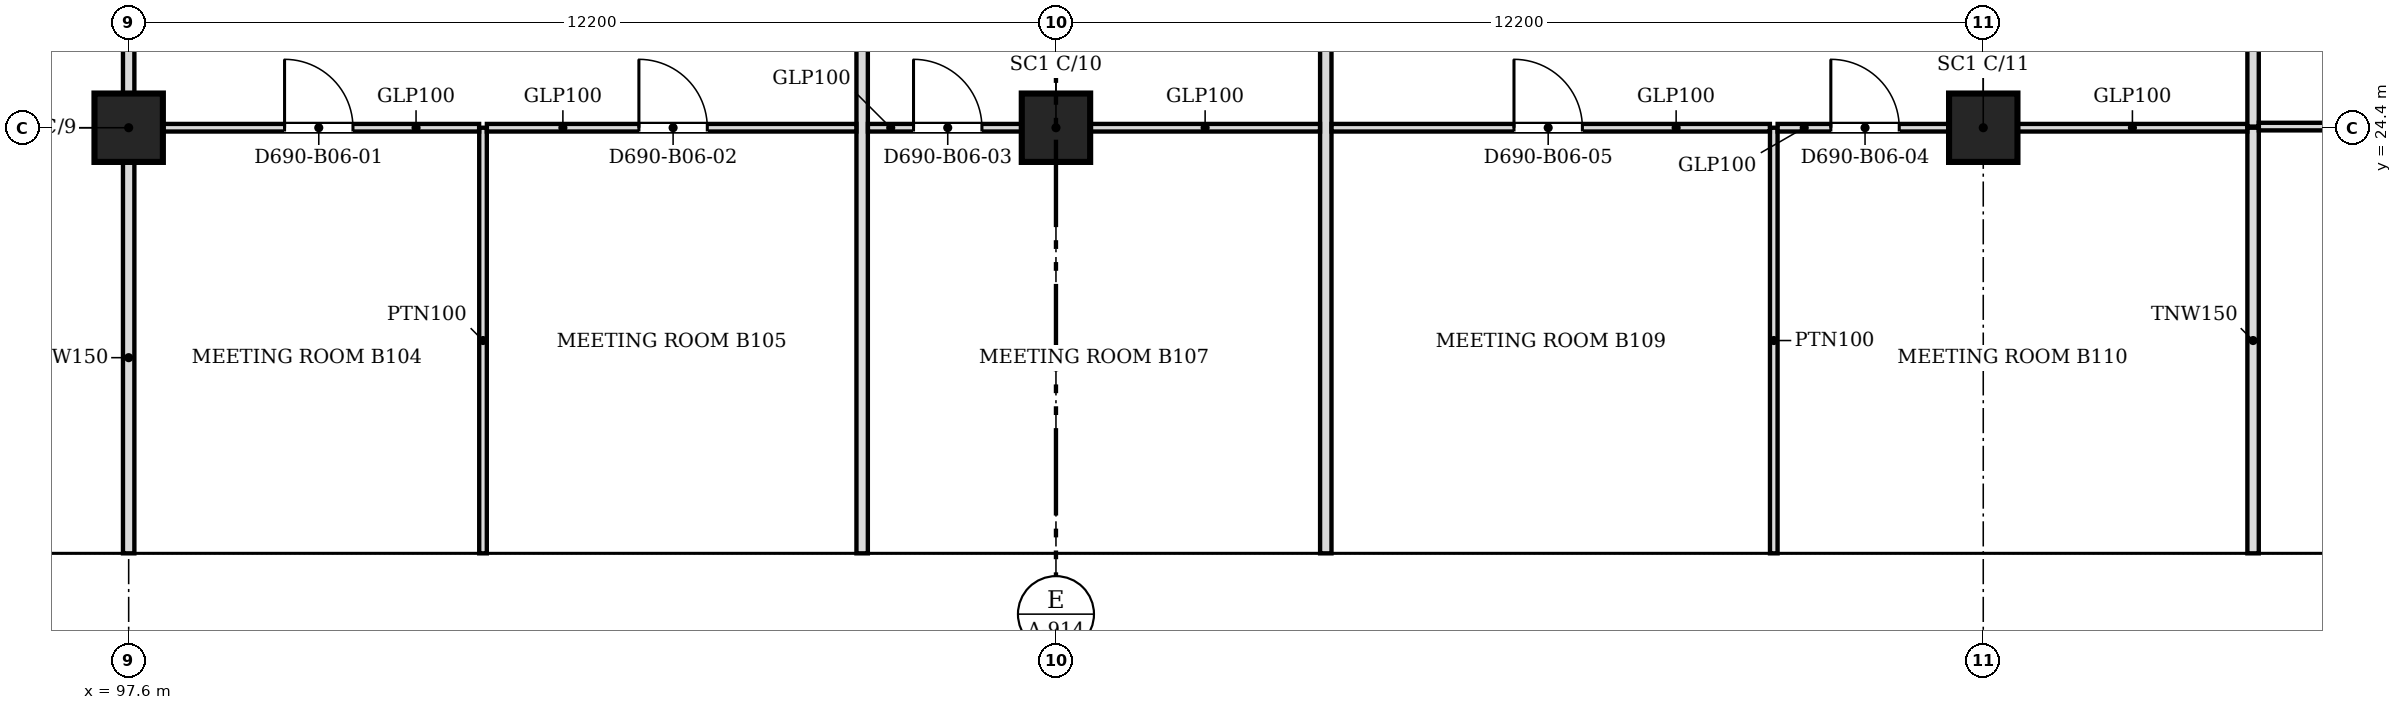
"""IFC4 building model, lengths in metres.
Left out: names, types, materials, properties, quantities, classifications, styles, units other than length and angle.
Written with IfcOpenShell. Run it as: python <this file> out.ifc"""

import sys

from ifc_helpers import new_model, si_unit, direction, frame, frame_2d, origin, origin_2d, place, context, subcontext, project, spatial, polyline, rectangle, outline, extrude, faceted_brep, source, transform, mapped, element, fill, save


model = new_model("IFC4")
c1 = context("Model", 3, precision=1e-05, world=origin(), true_north=direction((0.0, 1.0)))
c2 = subcontext(c1, "Body", "Model", "MODEL_VIEW")
j1 = project(units=[si_unit("LENGTHUNIT", "METRE"), si_unit("PLANEANGLEUNIT", "RADIAN")], contexts=[c1])
p1 = place(None, origin())
s1 = spatial("IfcSite", under=j1, at=p1, CompositionType="ELEMENT")
p2 = place(p1, origin())
s2 = spatial("IfcBuilding", under=s1, at=p2, CompositionType="ELEMENT")
p3 = place(p2, frame((0.0, 0.0, 56.2)))
s3 = spatial("IfcBuildingStorey", under=s2, at=p3, CompositionType="ELEMENT", Elevation=56.2)
for number, where, z_axis, x_axis in (
    (1, (97.6, 24.4, 0.0), (0.0, 0.0, 1.0), (1.0, 0.0, 0.0)),
    (2, (109.8, 24.4, 0.0), (0.0, 0.0, 1.0), (1.0, 0.0, 0.0)),
    (3, (122.0, 24.4, 0.0), (0.0, 0.0, 1.0), (1.0, 0.0, 0.0)),
):
    element("IfcColumn", number, at=place(p3, frame(where, z_axis=z_axis, x_axis=x_axis)), inside=s3, PredefinedType="COLUMN", context=c2, shape_type="SweptSolid", body=[
        extrude(rectangle(XDim=0.9, YDim=0.9, at=origin_2d()), origin(), (0.0, 0.0, 1.0), 3.6),
    ])
m1 = source(origin(), c2, "Body", "Brep", [
    faceted_brep([(3.05, -0.25, 0.0), (6.1, -0.25, 3.8), (6.1, -0.25, 3.8), (3.05, -0.25, 7.6), (0.0, -0.25, 3.8), (0.0, 0.25, 3.8), (3.05, 0.25, 7.6), (6.1, 0.25, 3.8), (6.1, 0.25, 3.8), (3.05, 0.25, 0.0)], [[[0, 1, 2, 3, 4]], [[5, 6, 7, 8, 9]], [[9, 8, 1, 0]], [[7, 6, 3, 2]], [[6, 5, 4, 3]], [[5, 9, 0, 4]], [[1, 8, 7, 2]]]),
])
p4 = place(p3, frame((94.55, 18.55, -3.8), z_axis=(0.0, 0.0, 1.0), x_axis=(1.0, 0.0, 0.0)))
e4 = element("IfcWall", 4, at=p4, inside=s3, PredefinedType="SOLIDWALL", context=c2, shape_type="MappedRepresentation", body=[
    mapped(m1, transform((0.0, 0.0, 0.0), scale=1.0)),
])
m2 = source(origin(), c2, "Body", "SweptSolid", [
    extrude(outline(polyline([(3.05, 0.399), (5.78, 3.8), (3.05, 7.201), (0.321, 3.8), (3.05, 0.399)])), frame((0.0, 0.26, 0.0), z_axis=(0.0, -1.0, 0.0), x_axis=(1.0, 0.0, 0.0)), (0.0, 0.0, 1.0), 0.52),
])
p5 = place(p4, origin())
e5 = element("IfcOpeningElement", 5, at=p5, cuts=e4, PredefinedType="OPENING", context=c2, shape_type="MappedRepresentation", body=[
    mapped(m2, transform((0.0, 0.0, 0.0), scale=1.0)),
])
m3 = source(origin(), c2, "Body", "SweptSolid", [
    extrude(outline(polyline([(3.05, 0.0), (6.1, 3.8), (3.05, 7.6), (0.0, 3.8), (3.05, 0.0)])), frame((0.0, 0.25, 0.0), z_axis=(0.0, -1.0, 0.0), x_axis=(1.0, 0.0, 0.0)), (0.0, 0.0, 1.0), 0.5),
])
p6 = place(p3, frame((100.65, 18.55, -3.8), z_axis=(0.0, 0.0, 1.0), x_axis=(1.0, 0.0, 0.0)))
e6 = element("IfcWall", 6, at=p6, inside=s3, PredefinedType="SOLIDWALL", context=c2, shape_type="MappedRepresentation", body=[
    mapped(m3, transform((0.0, 0.0, 0.0), scale=1.0)),
])
p7 = place(p6, origin())
e7 = element("IfcOpeningElement", 7, at=p7, cuts=e6, PredefinedType="OPENING", context=c2, shape_type="MappedRepresentation", body=[
    mapped(m2, transform((0.0, 0.0, 0.0), scale=1.0)),
])
p8 = place(p3, frame((106.75, 18.55, -3.8), z_axis=(0.0, 0.0, 1.0), x_axis=(1.0, 0.0, 0.0)))
e8 = element("IfcWall", 8, at=p8, inside=s3, PredefinedType="SOLIDWALL", context=c2, shape_type="MappedRepresentation", body=[
    mapped(m3, transform((0.0, 0.0, 0.0), scale=1.0)),
])
p9 = place(p8, origin())
e9 = element("IfcOpeningElement", 9, at=p9, cuts=e8, PredefinedType="OPENING", context=c2, shape_type="MappedRepresentation", body=[
    mapped(m2, transform((0.0, 0.0, 0.0), scale=1.0)),
])
p10 = place(p3, frame((112.85, 18.55, -3.8), z_axis=(0.0, 0.0, 1.0), x_axis=(1.0, 0.0, 0.0)))
e10 = element("IfcWall", 10, at=p10, inside=s3, PredefinedType="SOLIDWALL", context=c2, shape_type="MappedRepresentation", body=[
    mapped(m1, transform((0.0, 0.0, 0.0), scale=1.0)),
])
p11 = place(p10, origin())
e11 = element("IfcOpeningElement", 11, at=p11, cuts=e10, PredefinedType="OPENING", context=c2, shape_type="MappedRepresentation", body=[
    mapped(m2, transform((0.0, 0.0, 0.0), scale=1.0)),
])
p12 = place(p3, frame((118.95, 18.55, -3.8), z_axis=(0.0, 0.0, 1.0), x_axis=(1.0, 0.0, 0.0)))
e12 = element("IfcWall", 12, at=p12, inside=s3, PredefinedType="SOLIDWALL", context=c2, shape_type="MappedRepresentation", body=[
    mapped(m3, transform((0.0, 0.0, 0.0), scale=1.0)),
])
p13 = place(p12, origin())
e13 = element("IfcOpeningElement", 13, at=p13, cuts=e12, PredefinedType="OPENING", context=c2, shape_type="MappedRepresentation", body=[
    mapped(m2, transform((0.0, 0.0, 0.0), scale=1.0)),
])
m4 = source(origin(), c2, "Body", "Brep", [
    faceted_brep([(3.003, -0.25, 0.0), (3.05, -0.25, 0.06), (3.05, -0.25, 7.54), (3.003, -0.25, 7.6), (0.0, -0.25, 3.8), (0.0, 0.25, 3.8), (2.957, 0.25, 7.541), (2.957, 0.25, 0.059), (3.003, 0.0, 0.0), (3.003, 0.0, 7.6)], [[[0, 1, 2, 3, 4]], [[5, 6, 7]], [[1, 0, 8]], [[9, 3, 2]], [[6, 5, 4, 3, 9]], [[5, 7, 8, 0, 4]], [[1, 8, 7, 6, 9, 2]]]),
])
p14 = place(p3, frame((125.05, 18.55, -3.8), z_axis=(0.0, 0.0, 1.0), x_axis=(1.0, 0.0, 0.0)))
e14 = element("IfcWall", 14, at=p14, inside=s3, PredefinedType="SOLIDWALL", context=c2, shape_type="MappedRepresentation", body=[
    mapped(m4, transform((0.0, 0.0, 0.0), scale=1.0)),
])
m5 = source(origin(), c2, "Body", "SweptSolid", [
    extrude(outline(polyline([(2.803, 6.944), (0.319, 3.8), (2.803, 0.656), (2.803, 6.944)])), frame((0.0, 0.26, 0.0), z_axis=(0.0, -1.0, 0.0), x_axis=(1.0, 0.0, 0.0)), (0.0, 0.0, 1.0), 0.52),
])
p15 = place(p14, origin())
e15 = element("IfcOpeningElement", 15, at=p15, cuts=e14, PredefinedType="OPENING", context=c2, shape_type="MappedRepresentation", body=[
    mapped(m5, transform((0.0, 0.0, 0.0), scale=1.0)),
])
p16 = place(p2, frame((0.0, 0.0, 60.0)))
s4 = spatial("IfcBuildingStorey", under=s2, at=p16, CompositionType="ELEMENT", Elevation=60.0)
m6 = source(origin(), c2, "Body", "Brep", [
    faceted_brep([(3.003, -0.25, 0.0), (6.053, -0.25, 3.8), (3.003, -0.25, 7.6), (0.0, -0.25, 3.8), (0.047, 0.25, 3.859), (3.003, 0.25, 7.6), (6.053, 0.25, 3.8), (3.003, 0.25, 0.0), (0.047, 0.25, 3.741), (0.0, 0.0, 3.8)], [[[0, 1, 2, 3]], [[4, 5, 6, 7, 8]], [[7, 6, 1, 0]], [[6, 5, 2, 1]], [[5, 4, 9, 3, 2]], [[8, 7, 0, 3, 9]], [[8, 9, 4]]]),
])
p17 = place(p16, frame((91.547, 18.55, -3.8), z_axis=(0.0, 0.0, 1.0), x_axis=(1.0, 0.0, 0.0)))
e16 = element("IfcWall", 16, at=p17, inside=s4, PredefinedType="SOLIDWALL", context=c2, shape_type="MappedRepresentation", body=[
    mapped(m6, transform((0.0, 0.0, 0.0), scale=1.0)),
])
m7 = source(origin(), c2, "Body", "SweptSolid", [
    extrude(outline(polyline([(3.005, 0.401), (5.733, 3.8), (3.005, 7.199), (0.319, 3.8), (3.005, 0.401)])), frame((0.0, 0.26, 0.0), z_axis=(0.0, -1.0, 0.0), x_axis=(1.0, 0.0, 0.0)), (0.0, 0.0, 1.0), 0.52),
])
p18 = place(p17, origin())
e17 = element("IfcOpeningElement", 17, at=p18, cuts=e16, PredefinedType="OPENING", context=c2, shape_type="MappedRepresentation", body=[
    mapped(m7, transform((0.0, 0.0, 0.0), scale=1.0)),
])
p19 = place(p16, frame((97.6, 18.55, -3.8), z_axis=(0.0, 0.0, 1.0), x_axis=(1.0, 0.0, 0.0)))
e18 = element("IfcWall", 18, at=p19, inside=s4, PredefinedType="SOLIDWALL", context=c2, shape_type="MappedRepresentation", body=[
    mapped(m1, transform((0.0, 0.0, 0.0), scale=1.0)),
])
p20 = place(p19, origin())
e19 = element("IfcOpeningElement", 19, at=p20, cuts=e18, PredefinedType="OPENING", context=c2, shape_type="MappedRepresentation", body=[
    mapped(m2, transform((0.0, 0.0, 0.0), scale=1.0)),
])
p21 = place(p16, frame((103.7, 18.55, -3.8), z_axis=(0.0, 0.0, 1.0), x_axis=(1.0, 0.0, 0.0)))
e20 = element("IfcWall", 20, at=p21, inside=s4, PredefinedType="SOLIDWALL", context=c2, shape_type="MappedRepresentation", body=[
    mapped(m3, transform((0.0, 0.0, 0.0), scale=1.0)),
])
p22 = place(p21, origin())
e21 = element("IfcOpeningElement", 21, at=p22, cuts=e20, PredefinedType="OPENING", context=c2, shape_type="MappedRepresentation", body=[
    mapped(m2, transform((0.0, 0.0, 0.0), scale=1.0)),
])
p23 = place(p16, frame((109.8, 18.55, -3.8), z_axis=(0.0, 0.0, 1.0), x_axis=(1.0, 0.0, 0.0)))
e22 = element("IfcWall", 22, at=p23, inside=s4, PredefinedType="SOLIDWALL", context=c2, shape_type="MappedRepresentation", body=[
    mapped(m1, transform((0.0, 0.0, 0.0), scale=1.0)),
])
p24 = place(p23, origin())
e23 = element("IfcOpeningElement", 23, at=p24, cuts=e22, PredefinedType="OPENING", context=c2, shape_type="MappedRepresentation", body=[
    mapped(m2, transform((0.0, 0.0, 0.0), scale=1.0)),
])
p25 = place(p16, frame((115.9, 18.55, -3.8), z_axis=(0.0, 0.0, 1.0), x_axis=(1.0, 0.0, 0.0)))
e24 = element("IfcWall", 24, at=p25, inside=s4, PredefinedType="SOLIDWALL", context=c2, shape_type="MappedRepresentation", body=[
    mapped(m3, transform((0.0, 0.0, 0.0), scale=1.0)),
])
p26 = place(p25, origin())
e25 = element("IfcOpeningElement", 25, at=p26, cuts=e24, PredefinedType="OPENING", context=c2, shape_type="MappedRepresentation", body=[
    mapped(m2, transform((0.0, 0.0, 0.0), scale=1.0)),
])
m8 = source(origin(), c2, "Body", "Brep", [
    faceted_brep([(3.05, -0.25, 0.0), (6.053, -0.25, 3.8), (3.05, -0.25, 7.6), (0.0, -0.25, 3.8), (0.0, 0.25, 3.8), (3.05, 0.25, 7.6), (6.007, 0.25, 3.859), (6.007, 0.25, 3.741), (3.05, 0.25, 0.0), (6.053, 0.0, 3.8)], [[[0, 1, 2, 3]], [[4, 5, 6, 7, 8]], [[8, 7, 9, 1, 0]], [[6, 5, 2, 1, 9]], [[5, 4, 3, 2]], [[4, 8, 0, 3]], [[9, 7, 6]]]),
])
p27 = place(p16, frame((122.0, 18.55, -3.8), z_axis=(0.0, 0.0, 1.0), x_axis=(1.0, 0.0, 0.0)))
e26 = element("IfcWall", 26, at=p27, inside=s4, PredefinedType="SOLIDWALL", context=c2, shape_type="MappedRepresentation", body=[
    mapped(m8, transform((0.0, 0.0, 0.0), scale=1.0)),
])
m9 = source(origin(), c2, "Body", "SweptSolid", [
    extrude(outline(polyline([(3.049, 0.401), (5.735, 3.8), (3.049, 7.199), (0.321, 3.8), (3.049, 0.401)])), frame((0.0, 0.26, 0.0), z_axis=(0.0, -1.0, 0.0), x_axis=(1.0, 0.0, 0.0)), (0.0, 0.0, 1.0), 0.52),
])
p28 = place(p27, origin())
e27 = element("IfcOpeningElement", 27, at=p28, cuts=e26, PredefinedType="OPENING", context=c2, shape_type="MappedRepresentation", body=[
    mapped(m9, transform((0.0, 0.0, 0.0), scale=1.0)),
])
p29 = place(p3, frame((97.6, 18.8, 0.0), z_axis=(0.0, 0.0, 1.0), x_axis=(0.0, 1.0, 0.0)))
e28 = element("IfcWall", 28, at=p29, inside=s3, PredefinedType="PARTITIONING", context=c2, shape_type="SweptSolid", body=[
    extrude(rectangle(XDim=5.149, YDim=0.15, at=frame_2d((2.574, 0.0))), origin(), (0.0, 0.0, 1.0), 3.067),
])
p30 = place(p3, frame((102.262, 18.8, 0.0), z_axis=(0.0, 0.0, 1.0), x_axis=(0.0, 1.0, 0.0)))
e29 = element("IfcWall", 29, at=p30, inside=s3, PredefinedType="PARTITIONING", context=c2, shape_type="SweptSolid", body=[
    extrude(rectangle(XDim=5.6, YDim=0.1, at=frame_2d((2.8, 0.0))), origin(), (0.0, 0.0, 1.0), 3.067),
])
for number, where, z_axis, x_axis in (
    (30, (107.25, 18.8, 0.0), (0.0, 0.0, 1.0), (0.0, 1.0, 0.0)),
    (31, (113.35, 18.8, 0.0), (0.0, 0.0, 1.0), (0.0, 1.0, 0.0)),
):
    element("IfcWall", number, at=place(p3, frame(where, z_axis=z_axis, x_axis=x_axis)), inside=s3, PredefinedType="PARTITIONING", context=c2, shape_type="SweptSolid", body=[
        extrude(rectangle(XDim=15.324, YDim=0.15, at=frame_2d((7.662, 0.0))), origin(), (0.0, 0.0, 1.0), 3.067),
    ])
p31 = place(p3, frame((119.244, 18.8, 0.0), z_axis=(0.0, 0.0, 1.0), x_axis=(0.0, 1.0, 0.0)))
e32 = element("IfcWall", 32, at=p31, inside=s3, PredefinedType="PARTITIONING", context=c2, shape_type="SweptSolid", body=[
    extrude(rectangle(XDim=5.6, YDim=0.1, at=frame_2d((2.8, 0.0))), origin(), (0.0, 0.0, 1.0), 3.067),
])
p32 = place(p3, frame((125.55, 18.8, 0.0), z_axis=(0.0, 0.0, 1.0), x_axis=(0.0, 1.0, 0.0)))
e33 = element("IfcWall", 33, at=p32, inside=s3, PredefinedType="PARTITIONING", context=c2, shape_type="SweptSolid", body=[
    extrude(rectangle(XDim=5.6, YDim=0.15, at=frame_2d((2.8, 0.0))), origin(), (0.0, 0.0, 1.0), 3.067),
])
p33 = place(p3, frame((102.211, 24.4, 0.0), z_axis=(0.0, 0.0, 1.0), x_axis=(-1.0, 0.0, 0.0)))
e34 = element("IfcWall", 34, at=p33, inside=s3, PredefinedType="PARTITIONING", context=c2, shape_type="SweptSolid", body=[
    extrude(rectangle(XDim=4.16, YDim=0.1, at=frame_2d((2.08, 0.0))), origin(), (0.0, 0.0, 1.0), 3.067),
])
m10 = source(origin(), c2, "Body", "SweptSolid", [
    extrude(rectangle(XDim=0.9, YDim=2.1, at=frame_2d((0.45, 1.05))), frame((0.0, 0.06, 0.0), z_axis=(0.0, -1.0, 0.0), x_axis=(1.0, 0.0, 0.0)), (0.0, 0.0, 1.0), 0.12),
])
p34 = place(p33, frame((1.66, 0.0, 0.0)))
e35 = element("IfcOpeningElement", 35, at=p34, cuts=e34, PredefinedType="OPENING", context=c2, shape_type="MappedRepresentation", body=[
    mapped(m10, transform((0.0, 0.0, 0.0), scale=1.0)),
])
p35 = place(p3, frame((107.174, 24.4, 0.0), z_axis=(0.0, 0.0, 1.0), x_axis=(-1.0, 0.0, 0.0)))
e36 = element("IfcWall", 36, at=p35, inside=s3, PredefinedType="PARTITIONING", context=c2, shape_type="SweptSolid", body=[
    extrude(rectangle(XDim=4.861, YDim=0.1, at=frame_2d((2.431, 0.0))), origin(), (0.0, 0.0, 1.0), 3.067),
])
p36 = place(p35, frame((1.961, 0.0, 0.0)))
e37 = element("IfcOpeningElement", 37, at=p36, cuts=e36, PredefinedType="OPENING", context=c2, shape_type="MappedRepresentation", body=[
    mapped(m10, transform((0.0, 0.0, 0.0), scale=1.0)),
])
p37 = place(p3, frame((109.349, 24.4, 0.0), z_axis=(0.0, 0.0, 1.0), x_axis=(-1.0, 0.0, 0.0)))
e38 = element("IfcWall", 38, at=p37, inside=s3, PredefinedType="PARTITIONING", context=c2, shape_type="SweptSolid", body=[
    extrude(rectangle(XDim=2.023, YDim=0.1, at=frame_2d((1.012, 0.0))), origin(), (0.0, 0.0, 1.0), 3.067),
])
p38 = place(p37, frame((0.523, 0.0, 0.0)))
e39 = element("IfcOpeningElement", 39, at=p38, cuts=e38, PredefinedType="OPENING", context=c2, shape_type="MappedRepresentation", body=[
    mapped(m10, transform((0.0, 0.0, 0.0), scale=1.0)),
])
p39 = place(p3, frame((110.251, 24.4, 0.0), z_axis=(0.0, 0.0, 1.0), x_axis=(1.0, 0.0, 0.0)))
e40 = element("IfcWall", 40, at=p39, inside=s3, PredefinedType="PARTITIONING", context=c2, shape_type="SweptSolid", body=[
    extrude(rectangle(XDim=3.023, YDim=0.1, at=frame_2d((1.511, 0.0))), origin(), (0.0, 0.0, 1.0), 3.067),
])
p40 = place(p3, frame((119.193, 24.4, 0.0), z_axis=(0.0, 0.0, 1.0), x_axis=(-1.0, 0.0, 0.0)))
e41 = element("IfcWall", 41, at=p40, inside=s3, PredefinedType="PARTITIONING", context=c2, shape_type="SweptSolid", body=[
    extrude(rectangle(XDim=5.767, YDim=0.1, at=frame_2d((2.883, 0.0))), origin(), (0.0, 0.0, 1.0), 3.067),
])
p41 = place(p40, frame((2.467, 0.0, 0.0)))
e42 = element("IfcOpeningElement", 42, at=p41, cuts=e41, PredefinedType="OPENING", context=c2, shape_type="MappedRepresentation", body=[
    mapped(m10, transform((0.0, 0.0, 0.0), scale=1.0)),
])
p42 = place(p3, frame((121.549, 24.4, 0.0), z_axis=(0.0, 0.0, 1.0), x_axis=(-1.0, 0.0, 0.0)))
e43 = element("IfcWall", 43, at=p42, inside=s3, PredefinedType="PARTITIONING", context=c2, shape_type="SweptSolid", body=[
    extrude(rectangle(XDim=2.254, YDim=0.1, at=frame_2d((1.127, 0.0))), origin(), (0.0, 0.0, 1.0), 3.067),
])
p43 = place(p42, frame((0.654, 0.0, 0.0)))
e44 = element("IfcOpeningElement", 44, at=p43, cuts=e43, PredefinedType="OPENING", context=c2, shape_type="MappedRepresentation", body=[
    mapped(m10, transform((0.0, 0.0, 0.0), scale=1.0)),
])
p44 = place(p3, frame((122.451, 24.4, 0.0), z_axis=(0.0, 0.0, 1.0), x_axis=(1.0, 0.0, 0.0)))
e45 = element("IfcWall", 45, at=p44, inside=s3, PredefinedType="PARTITIONING", context=c2, shape_type="SweptSolid", body=[
    extrude(rectangle(XDim=3.023, YDim=0.1, at=frame_2d((1.512, 0.0))), origin(), (0.0, 0.0, 1.0), 3.067),
])
p45 = place(p3, frame((125.55, 24.415, 0.0), z_axis=(0.0, 0.0, 1.0), x_axis=(0.0, 1.0, 0.0)))
e46 = element("IfcWall", 46, at=p45, inside=s3, PredefinedType="PARTITIONING", context=c2, shape_type="SweptSolid", body=[
    extrude(rectangle(XDim=9.709, YDim=0.15, at=frame_2d((4.854, 0.0))), origin(), (0.0, 0.0, 1.0), 3.067),
])
p46 = place(p3, frame((133.67, 24.415, 0.0), z_axis=(0.0, 0.0, 1.0), x_axis=(-1.0, 0.0, 0.0)))
e47 = element("IfcWall", 47, at=p46, inside=s3, PredefinedType="PARTITIONING", context=c2, shape_type="SweptSolid", body=[
    extrude(rectangle(XDim=8.044, YDim=0.1, at=frame_2d((4.022, 0.0))), origin(), (0.0, 0.0, 1.0), 3.067),
])
p47 = place(p46, frame((3.544, 0.0, 0.0)))
e48 = element("IfcOpeningElement", 48, at=p47, cuts=e47, PredefinedType="OPENING", context=c2, shape_type="MappedRepresentation", body=[
    mapped(m10, transform((0.0, 0.0, 0.0), scale=1.0)),
])
p48 = place(p3, frame((97.6, 24.851, 0.0), z_axis=(0.0, 0.0, 1.0), x_axis=(0.0, 1.0, 0.0)))
e49 = element("IfcWall", 49, at=p48, inside=s3, PredefinedType="PARTITIONING", context=c2, shape_type="SweptSolid", body=[
    extrude(rectangle(XDim=9.273, YDim=0.15, at=frame_2d((4.636, 0.0))), origin(), (0.0, 0.0, 1.0), 3.067),
])
m11 = source(origin(), c2, "Body", "SweptSolid", [
    extrude(rectangle(XDim=0.9, YDim=2.1, at=frame_2d((0.45, 1.05))), frame((0.0, 0.025, 0.0), z_axis=(0.0, -1.0, 0.0), x_axis=(1.0, 0.0, 0.0)), (0.0, 0.0, 1.0), 0.05),
])
p49 = place(p34, origin())
e50 = element("IfcDoor", 50, at=p49, inside=s3, OperationType="SINGLE_SWING_RIGHT", PredefinedType="DOOR", context=c2, shape_type="MappedRepresentation", body=[
    mapped(m11, transform((0.0, 0.0, 0.0), scale=1.0)),
])
fill(e35, e50)
p50 = place(p36, origin())
e51 = element("IfcDoor", 51, at=p50, inside=s3, OperationType="SINGLE_SWING_RIGHT", PredefinedType="DOOR", context=c2, shape_type="MappedRepresentation", body=[
    mapped(m11, transform((0.0, 0.0, 0.0), scale=1.0)),
])
fill(e37, e51)
p51 = place(p38, origin())
e52 = element("IfcDoor", 52, at=p51, inside=s3, OperationType="SINGLE_SWING_RIGHT", PredefinedType="DOOR", context=c2, shape_type="MappedRepresentation", body=[
    mapped(m11, transform((0.0, 0.0, 0.0), scale=1.0)),
])
fill(e39, e52)
p52 = place(p43, origin())
e53 = element("IfcDoor", 53, at=p52, inside=s3, OperationType="SINGLE_SWING_RIGHT", PredefinedType="DOOR", context=c2, shape_type="MappedRepresentation", body=[
    mapped(m11, transform((0.0, 0.0, 0.0), scale=1.0)),
])
fill(e44, e53)
p53 = place(p41, origin())
e54 = element("IfcDoor", 54, at=p53, inside=s3, OperationType="SINGLE_SWING_RIGHT", PredefinedType="DOOR", context=c2, shape_type="MappedRepresentation", body=[
    mapped(m11, transform((0.0, 0.0, 0.0), scale=1.0)),
])
fill(e42, e54)
save(model, sys.argv[1])
